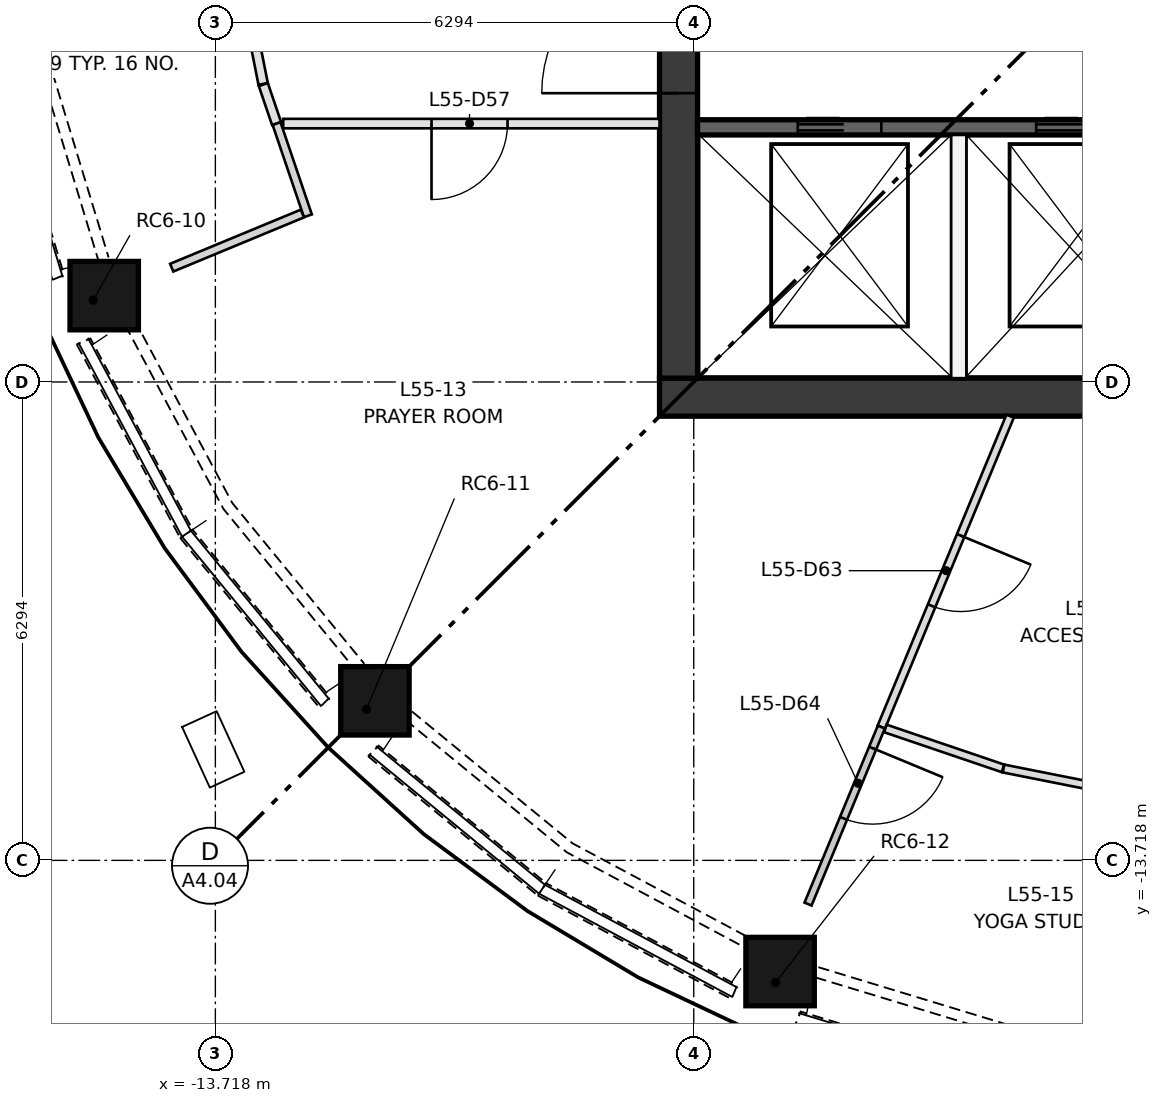
"""IFC4 building model, lengths in metres.
Left out: names, types, materials, properties, quantities, classifications, styles, units other than length and angle.
Written with IfcOpenShell. Run it as: python <this file> out.ifc"""

import sys

from ifc_helpers import new_model, si_unit, direction, frame, frame_2d, origin, origin_2d, place, context, subcontext, project, spatial, polyline, rectangle, outline, extrude, element, fill, save


model = new_model("IFC4")
c1 = context("Model", 3, precision=1e-05, world=origin(), true_north=direction((0.0, 1.0)))
c2 = subcontext(c1, "Body", "Model", "MODEL_VIEW")
j1 = project(units=[si_unit("LENGTHUNIT", "METRE"), si_unit("PLANEANGLEUNIT", "RADIAN")], contexts=[c1])
p1 = place(None, origin())
s1 = spatial("IfcSite", under=j1, at=p1, CompositionType="ELEMENT")
p2 = place(p1, origin())
s2 = spatial("IfcBuilding", under=s1, at=p2, CompositionType="ELEMENT")
p3 = place(p2, frame((0.0, 0.0, 204.4)))
s3 = spatial("IfcBuildingStorey", under=s2, at=p3, CompositionType="ELEMENT", Elevation=204.4)
p4 = place(p3, frame((-15.325, -6.348, 0.5), z_axis=(0.0, 0.0, 1.0), x_axis=(-0.38240644578, 0.923994215472, 0.0)))
e1 = element("IfcColumn", 1, at=p4, inside=s3, PredefinedType="COLUMN", context=c2, shape_type="SweptSolid", body=[
    extrude(rectangle(XDim=0.9, YDim=0.9, at=origin_2d()), origin(), (0.0, -0.218, 0.976), 2.408),
])
p5 = place(p3, frame((-11.729, -11.729, 0.5), z_axis=(0.0, 0.0, 1.0), x_axis=(-0.707106781187, 0.707106781187, 0.0)))
e2 = element("IfcColumn", 2, at=p5, inside=s3, PredefinedType="COLUMN", context=c2, shape_type="SweptSolid", body=[
    extrude(rectangle(XDim=0.9, YDim=0.9, at=origin_2d()), origin(), (0.0, -0.218, 0.976), 2.408),
])
p6 = place(p3, frame((-6.348, -15.325, 0.5), z_axis=(0.0, 0.0, 1.0), x_axis=(-0.923994215472, 0.38240644578, 0.0)))
e3 = element("IfcColumn", 3, at=p6, inside=s3, PredefinedType="COLUMN", context=c2, shape_type="SweptSolid", body=[
    extrude(rectangle(XDim=0.9, YDim=0.9, at=origin_2d()), origin(), (0.0, -0.218, 0.976), 2.408),
])
p7 = place(p3, frame((-7.874, -7.624, 0.0), z_axis=(0.0, 0.0, 1.0), x_axis=(1.0, 0.0, 0.0)))
e4 = element("IfcWall", 4, at=p7, inside=s3, PredefinedType="SHEAR", context=c2, shape_type="SweptSolid", body=[
    extrude(rectangle(XDim=15.748, YDim=0.5, at=frame_2d((7.874, 0.0))), origin(), (0.0, 0.0, 1.0), 3.35),
])
p8 = place(p3, frame((-7.624, -7.374, 0.0), z_axis=(0.0, 0.0, 1.0), x_axis=(0.0, 1.0, 0.0)))
e5 = element("IfcWall", 5, at=p8, inside=s3, PredefinedType="SHEAR", context=c2, shape_type="SweptSolid", body=[
    extrude(rectangle(XDim=14.748, YDim=0.5, at=frame_2d((7.374, 0.0))), origin(), (0.0, 0.0, 1.0), 3.35),
])
p9 = place(p8, frame((6.874, 0.0, 0.0)))
e6 = element("IfcOpeningElement", 6, at=p9, cuts=e5, PredefinedType="OPENING", context=c2, shape_type="SweptSolid", body=[
    extrude(rectangle(XDim=1.0, YDim=2.1, at=frame_2d((0.5, 1.05))), frame((0.0, 0.26, 0.0), z_axis=(0.0, -1.0, 0.0), x_axis=(1.0, 0.0, 0.0)), (0.0, 0.0, 1.0), 0.52),
])
p10 = place(p8, frame((3.75, 0.0, 0.0)))
e7 = element("IfcOpeningElement", 7, at=p10, cuts=e5, PredefinedType="OPENING", context=c2, shape_type="SweptSolid", body=[
    extrude(rectangle(XDim=1.8, YDim=2.1, at=frame_2d((0.9, 1.05))), frame((0.0, 0.26, 0.0), z_axis=(0.0, -1.0, 0.0), x_axis=(1.0, 0.0, 0.0)), (0.0, 0.0, 1.0), 0.52),
])
p11 = place(p8, frame((9.198, 0.0, 0.0)))
e8 = element("IfcOpeningElement", 8, at=p11, cuts=e5, PredefinedType="OPENING", context=c2, shape_type="SweptSolid", body=[
    extrude(rectangle(XDim=1.8, YDim=2.1, at=frame_2d((0.9, 1.05))), frame((0.0, 0.26, 0.0), z_axis=(0.0, -1.0, 0.0), x_axis=(1.0, 0.0, 0.0)), (0.0, 0.0, 1.0), 0.52),
])
p12 = place(p3, frame((-7.374, -4.074, 0.0), z_axis=(0.0, 0.0, 1.0), x_axis=(1.0, 0.0, 0.0)))
e9 = element("IfcWall", 9, at=p12, inside=s3, PredefinedType="SHEAR", context=c2, shape_type="SweptSolid", body=[
    extrude(rectangle(XDim=14.748, YDim=0.2, at=frame_2d((7.374, 0.0))), origin(), (0.0, 0.0, 1.0), 3.0),
])
p13 = place(p12, frame((1.319, 0.0, 0.0)))
e10 = element("IfcOpeningElement", 10, at=p13, cuts=e9, PredefinedType="OPENING", context=c2, shape_type="SweptSolid", body=[
    extrude(rectangle(XDim=1.1, YDim=2.1, at=frame_2d((0.55, 1.05))), frame((0.0, 0.11, 0.0), z_axis=(0.0, -1.0, 0.0), x_axis=(1.0, 0.0, 0.0)), (0.0, 0.0, 1.0), 0.22),
])
p14 = place(p12, frame((4.456, 0.0, 0.0)))
e11 = element("IfcOpeningElement", 11, at=p14, cuts=e9, PredefinedType="OPENING", context=c2, shape_type="SweptSolid", body=[
    extrude(rectangle(XDim=1.1, YDim=2.1, at=frame_2d((0.55, 1.05))), frame((0.0, 0.11, 0.0), z_axis=(0.0, -1.0, 0.0), x_axis=(1.0, 0.0, 0.0)), (0.0, 0.0, 1.0), 0.22),
])
p15 = place(p12, frame((7.918, 0.0, 0.0)))
e12 = element("IfcOpeningElement", 12, at=p15, cuts=e9, PredefinedType="OPENING", context=c2, shape_type="SweptSolid", body=[
    extrude(rectangle(XDim=1.0, YDim=2.1, at=frame_2d((0.5, 1.05))), frame((0.0, 0.11, 0.0), z_axis=(0.0, -1.0, 0.0), x_axis=(1.0, 0.0, 0.0)), (0.0, 0.0, 1.0), 0.22),
])
p16 = place(p12, frame((10.51, 0.0, 0.0)))
e13 = element("IfcOpeningElement", 13, at=p16, cuts=e9, PredefinedType="OPENING", context=c2, shape_type="SweptSolid", body=[
    extrude(rectangle(XDim=1.0, YDim=2.1, at=frame_2d((0.5, 1.05))), frame((0.0, 0.11, 0.0), z_axis=(0.0, -1.0, 0.0), x_axis=(1.0, 0.0, 0.0)), (0.0, 0.0, 1.0), 0.22),
])
p17 = place(p12, frame((12.903, 0.0, 0.0)))
e14 = element("IfcOpeningElement", 14, at=p17, cuts=e9, PredefinedType="OPENING", context=c2, shape_type="SweptSolid", body=[
    extrude(rectangle(XDim=0.8, YDim=2.1, at=frame_2d((0.4, 1.05))), frame((0.0, 0.11, 0.0), z_axis=(0.0, -1.0, 0.0), x_axis=(1.0, 0.0, 0.0)), (0.0, 0.0, 1.0), 0.22),
])
p18 = place(p3, frame((-3.937, -7.374, 0.0), z_axis=(0.0, 0.0, 1.0), x_axis=(0.0, 1.0, 0.0)))
e15 = element("IfcWall", 15, at=p18, inside=s3, PredefinedType="PARTITIONING", context=c2, shape_type="SweptSolid", body=[
    extrude(rectangle(XDim=3.2, YDim=0.2, at=frame_2d((1.6, 0.0))), origin(), (0.0, 0.0, 1.0), 3.0),
])
p19 = place(p3, frame((-16.727, -3.327, 0.0), z_axis=(-0.935242697182, -0.28337916088, 0.212172921331), x_axis=(0.289981848011, -0.957032145656, 2.070465e-06)))
e16 = element("IfcWall", 16, at=p19, inside=s3, PredefinedType="SOLIDWALL", context=c2, shape_type="SweptSolid", body=[
    extrude(outline(polyline([(0.0, 0.0), (2.889, 0.0), (2.869, 0.921), (0.019, 0.921), (0.0, 0.0)])), origin(), (0.0, 0.0, -1.0), 0.3),
])
p20 = place(p3, frame((-15.542, -6.928, 0.0), z_axis=(-0.86194406833, -0.460490666642, 0.212133846912), x_axis=(0.471214057348, -0.88201888422, -6.139239e-06)))
e17 = element("IfcWall", 17, at=p20, inside=s3, PredefinedType="SOLIDWALL", context=c2, shape_type="SweptSolid", body=[
    extrude(outline(polyline([(0.0, 0.0), (2.889, 0.0), (2.869, 0.921), (0.019, 0.921), (0.0, 0.0)])), origin(), (0.0, 0.0, -1.0), 0.3),
])
p21 = place(p3, frame((-14.181, -9.476, 0.0), z_axis=(-0.755401474704, -0.619877353438, 0.212416286358), x_axis=(0.634353847381, -0.77304281661, 4.54494e-07)))
e18 = element("IfcWall", 18, at=p21, inside=s3, PredefinedType="SOLIDWALL", context=c2, shape_type="SweptSolid", body=[
    extrude(outline(polyline([(0.0, 0.0), (2.889, 5.551e-17), (2.869, 0.921), (0.019, 0.921), (0.0, 0.0)])), origin(), (0.0, 0.0, -1.0), 0.3),
])
p22 = place(p3, frame((-11.709, -12.349, 0.0), z_axis=(-0.619877353438, -0.755401474704, 0.212416286358), x_axis=(0.77304281661, -0.634353847381, -4.54494e-07)))
e19 = element("IfcWall", 19, at=p22, inside=s3, PredefinedType="SOLIDWALL", context=c2, shape_type="SweptSolid", body=[
    extrude(outline(polyline([(0.0, 0.0), (2.889, -5.551e-17), (2.869, 0.921), (0.019, 0.921), (0.0, 0.0)])), origin(), (0.0, 0.0, -1.0), 0.3),
])
p23 = place(p3, frame((-9.476, -14.181, 0.0), z_axis=(-0.460433644275, -0.861898085138, 0.212444228104), x_axis=(0.882032067156, -0.471189380725, 6.6202e-08)))
e20 = element("IfcWall", 20, at=p23, inside=s3, PredefinedType="SOLIDWALL", context=c2, shape_type="SweptSolid", body=[
    extrude(outline(polyline([(0.0, 0.0), (2.889, 5.551e-17), (2.869, 0.921), (0.019, 0.921), (0.0, 0.0)])), origin(), (0.0, 0.0, -1.0), 0.3),
])
p24 = place(p3, frame((-6.092, -15.889, 0.0), z_axis=(-0.28338395091, -0.935152492223, 0.212563761391), x_axis=(0.957023433845, -0.29001059817, 4.460531e-06)))
e21 = element("IfcWall", 21, at=p24, inside=s3, PredefinedType="SOLIDWALL", context=c2, shape_type="SweptSolid", body=[
    extrude(outline(polyline([(0.0, 0.0), (2.889, 0.0), (2.869, 0.921), (0.019, 0.921), (0.0, 0.0)])), origin(), (0.0, 0.0, -1.0), 0.3),
])
p25 = place(p3, frame((-13.089, -3.503, 0.0), z_axis=(0.0, 0.0, 1.0), x_axis=(-0.195131330955, 0.980777122327, 0.0)))
e22 = element("IfcWall", 22, at=p25, inside=s3, PredefinedType="PARTITIONING", context=c2, shape_type="SweptSolid", body=[
    extrude(rectangle(XDim=1.764, YDim=0.125, at=frame_2d((0.882, 0.0))), origin(), (0.0, 0.0, 1.0), 3.0),
])
p26 = place(p3, frame((-12.913, -4.024, 0.0), z_axis=(0.0, 0.0, 1.0), x_axis=(-0.321491020406, 0.946912627331, 0.0)))
e23 = element("IfcWall", 23, at=p26, inside=s3, PredefinedType="PARTITIONING", context=c2, shape_type="SweptSolid", body=[
    extrude(rectangle(XDim=0.542, YDim=0.125, at=frame_2d((0.271, 0.0))), origin(), (0.0, 0.0, 1.0), 3.0),
])
p27 = place(p3, frame((-7.874, -4.024, 0.0), z_axis=(0.0, 0.0, 1.0), x_axis=(-1.0, 0.0, 0.0)))
e24 = element("IfcWall", 24, at=p27, inside=s3, PredefinedType="PARTITIONING", context=c2, shape_type="SweptSolid", body=[
    extrude(rectangle(XDim=4.951, YDim=0.125, at=frame_2d((2.476, 0.0))), origin(), (0.0, 0.0, 1.0), 3.0),
])
p28 = place(p27, frame((2.0, 0.0, 0.0)))
e25 = element("IfcOpeningElement", 25, at=p28, cuts=e24, PredefinedType="OPENING", context=c2, shape_type="SweptSolid", body=[
    extrude(rectangle(XDim=1.0, YDim=2.1, at=frame_2d((0.5, 1.05))), frame((0.0, 0.073, 0.0), z_axis=(0.0, -1.0, 0.0), x_axis=(1.0, 0.0, 0.0)), (0.0, 0.0, 1.0), 0.145),
])
p29 = place(p3, frame((-12.913, -4.024, 0.0), z_axis=(0.0, 0.0, 1.0), x_axis=(0.32136960108, -0.946953842329, 0.0)))
e26 = element("IfcWall", 26, at=p29, inside=s3, PredefinedType="PARTITIONING", context=c2, shape_type="SweptSolid", body=[
    extrude(rectangle(XDim=1.281, YDim=0.11, at=frame_2d((0.64, 0.0))), origin(), (0.0, 0.0, 1.0), 3.0),
])
p30 = place(p3, frame((-12.573, -5.208, 0.0), z_axis=(0.0, 0.0, 1.0), x_axis=(-0.923893729339, -0.382649156394, 0.0)))
e27 = element("IfcWall", 27, at=p30, inside=s3, PredefinedType="PARTITIONING", context=c2, shape_type="SweptSolid", body=[
    extrude(rectangle(XDim=1.861, YDim=0.11, at=frame_2d((0.931, 0.0))), origin(), (0.0, 0.0, 1.0), 3.0),
])
p31 = place(p3, frame((-3.261, -7.874, 0.0), z_axis=(0.0, 0.0, 1.0), x_axis=(-0.38271544888, -0.923866270186, 0.0)))
e28 = element("IfcWall", 28, at=p31, inside=s3, PredefinedType="PARTITIONING", context=c2, shape_type="SweptSolid", body=[
    extrude(rectangle(XDim=4.427, YDim=0.105, at=frame_2d((2.214, 0.0))), origin(), (0.0, 0.0, 1.0), 3.0),
])
p32 = place(p31, frame((1.7, 0.0, 0.0)))
e29 = element("IfcOpeningElement", 29, at=p32, cuts=e28, PredefinedType="OPENING", context=c2, shape_type="SweptSolid", body=[
    extrude(rectangle(XDim=1.0, YDim=2.1, at=frame_2d((0.5, 1.05))), frame((0.0, 0.062, 0.0), z_axis=(0.0, -1.0, 0.0), x_axis=(1.0, 0.0, 0.0)), (0.0, 0.0, 1.0), 0.125),
])
p33 = place(p3, frame((-4.956, -11.964, 0.0), z_axis=(0.0, 0.0, 1.0), x_axis=(-0.382654099242, -0.923891682143, 0.0)))
e30 = element("IfcWall", 30, at=p33, inside=s3, PredefinedType="PARTITIONING", context=c2, shape_type="SweptSolid", body=[
    extrude(rectangle(XDim=2.52, YDim=0.1, at=frame_2d((1.26, 0.0))), origin(), (0.0, 0.0, 1.0), 3.0),
])
p34 = place(p33, frame((0.3, 0.0, 0.0)))
e31 = element("IfcOpeningElement", 31, at=p34, cuts=e30, PredefinedType="OPENING", context=c2, shape_type="SweptSolid", body=[
    extrude(rectangle(XDim=1.0, YDim=2.1, at=frame_2d((0.5, 1.05))), frame((0.0, 0.06, 0.0), z_axis=(0.0, -1.0, 0.0), x_axis=(1.0, 0.0, 0.0)), (0.0, 0.0, 1.0), 0.12),
])
p35 = place(p3, frame((-3.355, -12.508, 0.0), z_axis=(0.0, 0.0, 1.0), x_axis=(-0.946921060296, 0.321466181063, 0.0)))
e32 = element("IfcWall", 32, at=p35, inside=s3, PredefinedType="PARTITIONING", context=c2, shape_type="SweptSolid", body=[
    extrude(rectangle(XDim=1.634, YDim=0.105, at=frame_2d((0.817, 0.0))), origin(), (0.0, 0.0, 1.0), 3.0),
])
p36 = place(p3, frame((-1.694, -12.838, 0.0), z_axis=(0.0, 0.0, 1.0), x_axis=(-0.980819267524, 0.194919379368, 0.0)))
e33 = element("IfcWall", 33, at=p36, inside=s3, PredefinedType="PARTITIONING", context=c2, shape_type="SweptSolid", body=[
    extrude(rectangle(XDim=1.687, YDim=0.105, at=frame_2d((0.844, 0.0))), origin(), (0.0, 0.0, 1.0), 3.0),
])
p37 = place(p13, origin())
e34 = element("IfcDoor", 34, at=p37, inside=s3, OperationType="DOUBLE_DOOR_SLIDING", PredefinedType="DOOR", context=c2, shape_type="SweptSolid", body=[
    extrude(rectangle(XDim=1.1, YDim=2.1, at=frame_2d((0.55, 1.05))), frame((0.0, 0.025, 0.0), z_axis=(0.0, -1.0, 0.0), x_axis=(1.0, 0.0, 0.0)), (0.0, 0.0, 1.0), 0.05),
])
fill(e10, e34)
p38 = place(p14, origin())
e35 = element("IfcDoor", 35, at=p38, inside=s3, OperationType="DOUBLE_DOOR_SLIDING", PredefinedType="DOOR", context=c2, shape_type="SweptSolid", body=[
    extrude(rectangle(XDim=1.1, YDim=2.1, at=frame_2d((0.55, 1.05))), frame((0.0, 0.025, 0.0), z_axis=(0.0, -1.0, 0.0), x_axis=(1.0, 0.0, 0.0)), (0.0, 0.0, 1.0), 0.05),
])
fill(e11, e35)
p39 = place(p10, origin())
e36 = element("IfcDoor", 36, at=p39, inside=s3, OperationType="DOUBLE_DOOR_SINGLE_SWING", PredefinedType="DOOR", context=c2, shape_type="SweptSolid", body=[
    extrude(rectangle(XDim=1.8, YDim=2.1, at=frame_2d((0.9, 1.05))), frame((0.0, 0.025, 0.0), z_axis=(0.0, -1.0, 0.0), x_axis=(1.0, 0.0, 0.0)), (0.0, 0.0, 1.0), 0.05),
])
fill(e7, e36)
p40 = place(p28, origin())
e37 = element("IfcDoor", 37, at=p40, inside=s3, OperationType="SINGLE_SWING_RIGHT", PredefinedType="DOOR", context=c2, shape_type="SweptSolid", body=[
    extrude(rectangle(XDim=1.0, YDim=2.1, at=frame_2d((0.5, 1.05))), frame((0.0, 0.025, 0.0), z_axis=(0.0, -1.0, 0.0), x_axis=(1.0, 0.0, 0.0)), (0.0, 0.0, 1.0), 0.05),
])
fill(e25, e37)
p41 = place(p32, origin())
e38 = element("IfcDoor", 38, at=p41, inside=s3, OperationType="SINGLE_SWING_LEFT", PredefinedType="DOOR", context=c2, shape_type="SweptSolid", body=[
    extrude(rectangle(XDim=1.0, YDim=2.1, at=frame_2d((0.5, 1.05))), frame((0.0, 0.025, 0.0), z_axis=(0.0, -1.0, 0.0), x_axis=(1.0, 0.0, 0.0)), (0.0, 0.0, 1.0), 0.05),
])
fill(e29, e38)
p42 = place(p34, origin())
e39 = element("IfcDoor", 39, at=p42, inside=s3, OperationType="SINGLE_SWING_LEFT", PredefinedType="DOOR", context=c2, shape_type="SweptSolid", body=[
    extrude(rectangle(XDim=1.0, YDim=2.1, at=frame_2d((0.5, 1.05))), frame((0.0, 0.025, 0.0), z_axis=(0.0, -1.0, 0.0), x_axis=(1.0, 0.0, 0.0)), (0.0, 0.0, 1.0), 0.05),
])
fill(e31, e39)
save(model, sys.argv[1])
